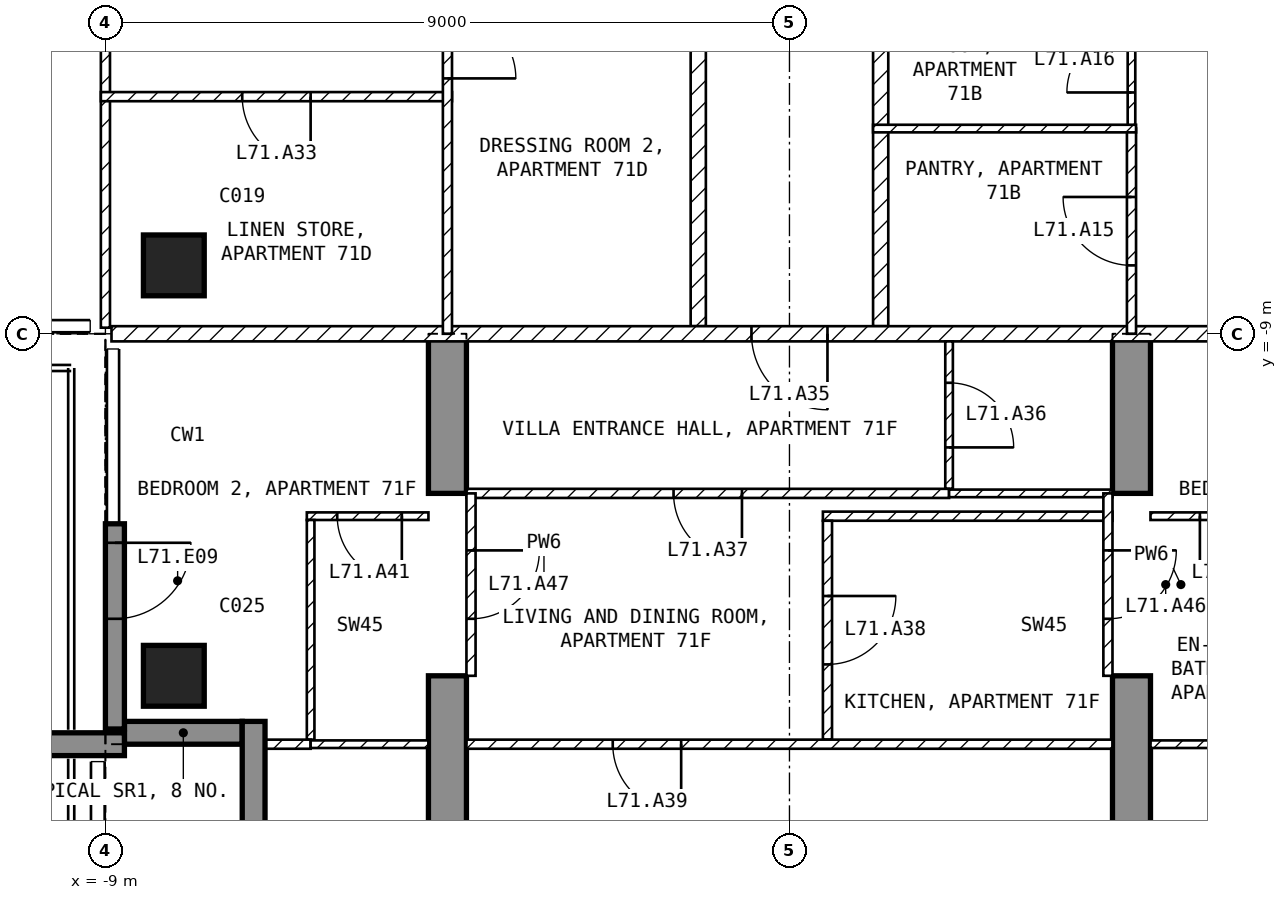
"""IFC4 building model, lengths in metres.
Left out: names, types, materials, properties, quantities, classifications, styles, units other than length and angle.
Written with IfcOpenShell. Run it as: python <this file> out.ifc"""

import sys

from ifc_helpers import new_model, si_unit, direction, frame, frame_2d, origin, origin_2d, place, context, subcontext, project, spatial, polyline, rectangle, outline, extrude, element, fill, save


model = new_model("IFC4")
c1 = context("Model", 3, precision=1e-05, world=origin(), true_north=direction((0.0, 1.0)))
c2 = subcontext(c1, "Body", "Model", "MODEL_VIEW")
j1 = project(units=[si_unit("LENGTHUNIT", "METRE"), si_unit("PLANEANGLEUNIT", "RADIAN")], contexts=[c1])
p1 = place(None, origin())
s1 = spatial("IfcSite", under=j1, at=p1, CompositionType="ELEMENT")
p2 = place(p1, origin())
s2 = spatial("IfcBuilding", under=s1, at=p2, CompositionType="ELEMENT")
p3 = place(p2, frame((0.0, 0.0, 278.0)))
s3 = spatial("IfcBuildingStorey", under=s2, at=p3, CompositionType="ELEMENT", Elevation=278.0)
for number, where, z_axis, x_axis in (
    (1, (-8.1, -13.5, -0.25), (0.0, 0.0, 1.0), (1.0, 0.0, 0.0)),
    (2, (-8.1, -8.1, -0.25), (0.0, 0.0, 1.0), (1.0, 0.0, 0.0)),
):
    element("IfcColumn", number, at=place(p3, frame(where, z_axis=z_axis, x_axis=x_axis)), inside=s3, PredefinedType="COLUMN", context=c2, shape_type="SweptSolid", body=[
        extrude(rectangle(XDim=0.8, YDim=0.8, at=origin_2d()), origin(), (0.0, 0.0, 1.0), 3.5),
    ])
for number, where, z_axis, x_axis in (
    (3, (-4.75, -16.7, -0.25), (1.0, 0.0, 0.0), (0.0, 1.0, 0.0)),
    (4, (4.25, -16.7, -0.25), (1.0, 0.0, 0.0), (0.0, 1.0, 0.0)),
):
    element("IfcWall", number, at=place(p3, frame(where, z_axis=z_axis, x_axis=x_axis)), inside=s3, PredefinedType="SHEAR", context=c2, shape_type="SweptSolid", body=[
        extrude(outline(polyline([(0.0, 0.0), (3.2, 0.0), (3.2, 2.65), (5.6, 2.65), (5.6, 0.0), (7.7, 0.0), (7.7, 3.5), (0.0, 3.5), (0.0, 0.0)])), origin(), (0.0, 0.0, 1.0), 0.5),
    ])
p4 = place(p3, frame((-8.875, -11.5, 0.0), z_axis=(0.0, 0.0, 1.0), x_axis=(0.0, -1.0, 0.0)))
e5 = element("IfcWall", 5, at=p4, inside=s3, PredefinedType="SOLIDWALL", context=c2, shape_type="SweptSolid", body=[
    extrude(rectangle(XDim=2.7, YDim=0.25, at=frame_2d((1.35, 0.0))), origin(), (0.0, 0.0, 1.0), 3.25),
])
p5 = place(p4, frame((0.25, 0.0, 0.0)))
e6 = element("IfcOpeningElement", 6, at=p5, cuts=e5, PredefinedType="OPENING", context=c2, shape_type="SweptSolid", body=[
    extrude(rectangle(XDim=1.0, YDim=2.4, at=frame_2d((0.5, 1.2))), frame((0.0, 0.135, 0.0), z_axis=(0.0, -1.0, 0.0), x_axis=(1.0, 0.0, 0.0)), (0.0, 0.0, 1.0), 0.27),
])
p6 = place(p3, frame((-8.75, -14.25, 0.0), z_axis=(0.0, 0.0, 1.0), x_axis=(1.0, 0.0, 0.0)))
e7 = element("IfcWall", 7, at=p6, inside=s3, PredefinedType="SOLIDWALL", context=c2, shape_type="SweptSolid", body=[
    extrude(rectangle(XDim=1.55, YDim=0.3, at=frame_2d((0.775, 0.0))), origin(), (0.0, 0.0, 1.0), 3.25),
])
p7 = place(p3, frame((-7.05, -14.1, 0.0), z_axis=(0.0, 0.0, 1.0), x_axis=(0.0, -1.0, 0.0)))
e8 = element("IfcWall", 8, at=p7, inside=s3, PredefinedType="SOLIDWALL", context=c2, shape_type="SweptSolid", body=[
    extrude(rectangle(XDim=1.8, YDim=0.3, at=frame_2d((0.9, 0.0))), origin(), (0.0, 0.0, 1.0), 3.25),
])
p8 = place(p3, frame((-8.75, -14.4, 0.0), z_axis=(0.0, 0.0, 1.0), x_axis=(-1.0, 0.0, 0.0)))
e9 = element("IfcWall", 9, at=p8, inside=s3, PredefinedType="SOLIDWALL", context=c2, shape_type="SweptSolid", body=[
    extrude(rectangle(XDim=2.95, YDim=0.3, at=frame_2d((1.475, 0.0))), origin(), (0.0, 0.0, 1.0), 3.25),
])
for number, where, z_axis, x_axis in (
    (10, (1.2, -4.6, 0.0), (0.0, 0.0, 1.0), (0.0, -1.0, 0.0)),
    (11, (-1.2, -8.9, 0.0), (0.0, 0.0, 1.0), (0.0, 1.0, 0.0)),
):
    element("IfcWall", number, at=place(p3, frame(where, z_axis=z_axis, x_axis=x_axis)), inside=s3, PredefinedType="PARTITIONING", context=c2, shape_type="SweptSolid", body=[
        extrude(rectangle(XDim=4.3, YDim=0.2, at=frame_2d((2.15, 0.0))), origin(), (0.0, 0.0, 1.0), 3.25),
    ])
p9 = place(p3, frame((8.92, -9.0, 0.0), z_axis=(0.0, 0.0, 1.0), x_axis=(-1.0, 0.0, 0.0)))
e12 = element("IfcWall", 12, at=p9, inside=s3, PredefinedType="PARTITIONING", context=c2, shape_type="SweptSolid", body=[
    extrude(rectangle(XDim=17.84, YDim=0.2, at=frame_2d((8.92, 0.0))), origin(), (0.0, 0.0, 1.0), 3.25),
])
p10 = place(p9, frame((8.42, 0.0, 0.0)))
e13 = element("IfcOpeningElement", 13, at=p10, cuts=e12, PredefinedType="OPENING", context=c2, shape_type="SweptSolid", body=[
    extrude(rectangle(XDim=1.0, YDim=2.1, at=frame_2d((0.5, 1.05))), frame((0.0, 0.11, 0.0), z_axis=(0.0, -1.0, 0.0), x_axis=(1.0, 0.0, 0.0)), (0.0, 0.0, 1.0), 0.22),
])
p11 = place(p3, frame((4.5, -6.3, 0.0), z_axis=(0.0, 0.0, 1.0), x_axis=(0.0, 1.0, 0.0)))
e14 = element("IfcWall", 14, at=p11, inside=s3, PredefinedType="PARTITIONING", context=c2, shape_type="SweptSolid", body=[
    extrude(rectangle(XDim=1.8, YDim=0.1, at=frame_2d((0.9, 0.0))), origin(), (0.0, 0.0, 1.0), 3.25),
])
p12 = place(p11, frame((0.475, 0.0, 0.0)))
e15 = element("IfcOpeningElement", 15, at=p12, cuts=e14, PredefinedType="OPENING", context=c2, shape_type="SweptSolid", body=[
    extrude(rectangle(XDim=0.85, YDim=2.1, at=frame_2d((0.425, 1.05))), frame((0.0, 0.06, 0.0), z_axis=(0.0, -1.0, 0.0), x_axis=(1.0, 0.0, 0.0)), (0.0, 0.0, 1.0), 0.12),
])
p13 = place(p3, frame((4.5, -9.0, 0.0), z_axis=(0.0, 0.0, 1.0), x_axis=(0.0, 1.0, 0.0)))
e16 = element("IfcWall", 16, at=p13, inside=s3, PredefinedType="PARTITIONING", context=c2, shape_type="SweptSolid", body=[
    extrude(rectangle(XDim=2.7, YDim=0.12, at=frame_2d((1.35, 0.0))), origin(), (0.0, 0.0, 1.0), 3.25),
])
p14 = place(p13, frame((0.9, 0.0, 0.0)))
e17 = element("IfcOpeningElement", 17, at=p14, cuts=e16, PredefinedType="OPENING", context=c2, shape_type="SweptSolid", body=[
    extrude(rectangle(XDim=0.9, YDim=2.1, at=frame_2d((0.45, 1.05))), frame((0.0, 0.07, 0.0), z_axis=(0.0, -1.0, 0.0), x_axis=(1.0, 0.0, 0.0)), (0.0, 0.0, 1.0), 0.14),
])
p15 = place(p3, frame((4.56, -6.3, 0.0), z_axis=(0.0, 0.0, 1.0), x_axis=(-1.0, 0.0, 0.0)))
e18 = element("IfcWall", 18, at=p15, inside=s3, PredefinedType="PARTITIONING", context=c2, shape_type="SweptSolid", body=[
    extrude(rectangle(XDim=3.46, YDim=0.1, at=frame_2d((1.73, 0.0))), origin(), (0.0, 0.0, 1.0), 3.25),
])
p16 = place(p3, frame((-9.0, -1.3, 0.0), z_axis=(0.0, 0.0, 1.0), x_axis=(0.0, -1.0, 0.0)))
e19 = element("IfcWall", 19, at=p16, inside=s3, PredefinedType="PARTITIONING", context=c2, shape_type="SweptSolid", body=[
    extrude(rectangle(XDim=7.62, YDim=0.12, at=frame_2d((3.81, 0.0))), origin(), (0.0, 0.0, 1.0), 3.25),
])
p17 = place(p16, frame((1.15, 0.0, 0.0)))
e20 = element("IfcOpeningElement", 20, at=p17, cuts=e19, PredefinedType="OPENING", context=c2, shape_type="SweptSolid", body=[
    extrude(rectangle(XDim=0.9, YDim=2.1, at=frame_2d((0.45, 1.05))), frame((0.0, 0.07, 0.0), z_axis=(0.0, -1.0, 0.0), x_axis=(1.0, 0.0, 0.0)), (0.0, 0.0, 1.0), 0.14),
])
p18 = place(p3, frame((-4.44, -5.88, 0.0), z_axis=(0.0, 0.0, 1.0), x_axis=(-1.0, 0.0, 0.0)))
e21 = element("IfcWall", 21, at=p18, inside=s3, PredefinedType="PARTITIONING", context=c2, shape_type="SweptSolid", body=[
    extrude(rectangle(XDim=4.62, YDim=0.12, at=frame_2d((2.31, 0.0))), origin(), (0.0, 0.0, 1.0), 3.25),
])
p19 = place(p18, frame((1.86, 0.0, 0.0)))
e22 = element("IfcOpeningElement", 22, at=p19, cuts=e21, PredefinedType="OPENING", context=c2, shape_type="SweptSolid", body=[
    extrude(rectangle(XDim=0.9, YDim=2.1, at=frame_2d((0.45, 1.05))), frame((0.0, 0.07, 0.0), z_axis=(0.0, -1.0, 0.0), x_axis=(1.0, 0.0, 0.0)), (0.0, 0.0, 1.0), 0.14),
])
p20 = place(p3, frame((-4.5, -4.5, 0.0), z_axis=(0.0, 0.0, 1.0), x_axis=(0.0, -1.0, 0.0)))
e23 = element("IfcWall", 23, at=p20, inside=s3, PredefinedType="PARTITIONING", context=c2, shape_type="SweptSolid", body=[
    extrude(rectangle(XDim=4.5, YDim=0.12, at=frame_2d((2.25, 0.0))), origin(), (0.0, 0.0, 1.0), 3.25),
])
p21 = place(p20, frame((0.24, 0.0, 0.0)))
e24 = element("IfcOpeningElement", 24, at=p21, cuts=e23, PredefinedType="OPENING", context=c2, shape_type="SweptSolid", body=[
    extrude(rectangle(XDim=0.9, YDim=2.1, at=frame_2d((0.45, 1.05))), frame((0.0, 0.07, 0.0), z_axis=(0.0, -1.0, 0.0), x_axis=(1.0, 0.0, 0.0)), (0.0, 0.0, 1.0), 0.14),
])
p22 = place(p3, frame((2.1, -9.1, 0.0), z_axis=(0.0, 0.0, 1.0), x_axis=(0.0, -1.0, 0.0)))
e25 = element("IfcWall", 25, at=p22, inside=s3, PredefinedType="PARTITIONING", context=c2, shape_type="SweptSolid", body=[
    extrude(rectangle(XDim=1.94, YDim=0.1, at=frame_2d((0.97, 0.0))), origin(), (0.0, 0.0, 1.0), 3.25),
])
p23 = place(p22, frame((0.545, 0.0, 0.0)))
e26 = element("IfcOpeningElement", 26, at=p23, cuts=e25, PredefinedType="OPENING", context=c2, shape_type="SweptSolid", body=[
    extrude(rectangle(XDim=0.85, YDim=2.1, at=frame_2d((0.425, 1.05))), frame((0.0, 0.06, 0.0), z_axis=(0.0, -1.0, 0.0), x_axis=(1.0, 0.0, 0.0)), (0.0, 0.0, 1.0), 0.12),
])
p24 = place(p3, frame((2.1, -11.1, 0.0), z_axis=(0.0, 0.0, 1.0), x_axis=(-1.0, 0.0, 0.0)))
e27 = element("IfcWall", 27, at=p24, inside=s3, PredefinedType="PARTITIONING", context=c2, shape_type="SweptSolid", body=[
    extrude(rectangle(XDim=6.35, YDim=0.12, at=frame_2d((3.175, 0.0))), origin(), (0.0, 0.0, 1.0), 3.25),
])
p25 = place(p24, frame((2.725, 0.0, 0.0)))
e28 = element("IfcOpeningElement", 28, at=p25, cuts=e27, PredefinedType="OPENING", context=c2, shape_type="SweptSolid", body=[
    extrude(rectangle(XDim=0.9, YDim=2.1, at=frame_2d((0.45, 1.05))), frame((0.0, 0.07, 0.0), z_axis=(0.0, -1.0, 0.0), x_axis=(1.0, 0.0, 0.0)), (0.0, 0.0, 1.0), 0.14),
])
p26 = place(p3, frame((4.25, -11.1, 0.0), z_axis=(0.0, 0.0, 1.0), x_axis=(-1.0, 0.0, 0.0)))
e29 = element("IfcWall", 29, at=p26, inside=s3, PredefinedType="PARTITIONING", context=c2, shape_type="SweptSolid", body=[
    extrude(rectangle(XDim=2.15, YDim=0.1, at=frame_2d((1.075, 0.0))), origin(), (0.0, 0.0, 1.0), 3.25),
])
p27 = place(p3, frame((4.25, -11.4, 0.0), z_axis=(0.0, 0.0, 1.0), x_axis=(-1.0, 0.0, 0.0)))
e30 = element("IfcWall", 30, at=p27, inside=s3, PredefinedType="PARTITIONING", context=c2, shape_type="SweptSolid", body=[
    extrude(rectangle(XDim=3.81, YDim=0.12, at=frame_2d((1.905, 0.0))), origin(), (0.0, 0.0, 1.0), 3.25),
])
p28 = place(p3, frame((0.5, -11.46, 0.0), z_axis=(0.0, 0.0, 1.0), x_axis=(0.0, -1.0, 0.0)))
e31 = element("IfcWall", 31, at=p28, inside=s3, PredefinedType="PARTITIONING", context=c2, shape_type="SweptSolid", body=[
    extrude(rectangle(XDim=2.88, YDim=0.12, at=frame_2d((1.44, 0.0))), origin(), (0.0, 0.0, 1.0), 3.25),
])
p29 = place(p28, frame((0.99, 0.0, 0.0)))
e32 = element("IfcOpeningElement", 32, at=p29, cuts=e31, PredefinedType="OPENING", context=c2, shape_type="SweptSolid", body=[
    extrude(rectangle(XDim=0.9, YDim=2.1, at=frame_2d((0.45, 1.05))), frame((0.0, 0.07, 0.0), z_axis=(0.0, -1.0, 0.0), x_axis=(1.0, 0.0, 0.0)), (0.0, 0.0, 1.0), 0.14),
])
p30 = place(p3, frame((4.25, -14.4, 0.0), z_axis=(0.0, 0.0, 1.0), x_axis=(-1.0, 0.0, 0.0)))
e33 = element("IfcWall", 33, at=p30, inside=s3, PredefinedType="PARTITIONING", context=c2, shape_type="SweptSolid", body=[
    extrude(rectangle(XDim=8.5, YDim=0.12, at=frame_2d((4.25, 0.0))), origin(), (0.0, 0.0, 1.0), 3.25),
])
p31 = place(p30, frame((5.675, 0.0, 0.0)))
e34 = element("IfcOpeningElement", 34, at=p31, cuts=e33, PredefinedType="OPENING", context=c2, shape_type="SweptSolid", body=[
    extrude(rectangle(XDim=0.9, YDim=2.1, at=frame_2d((0.45, 1.05))), frame((0.0, 0.07, 0.0), z_axis=(0.0, -1.0, 0.0), x_axis=(1.0, 0.0, 0.0)), (0.0, 0.0, 1.0), 0.14),
])
p32 = place(p3, frame((6.95, -11.4, 0.0), z_axis=(0.0, 0.0, 1.0), x_axis=(-1.0, 0.0, 0.0)))
e35 = element("IfcWall", 35, at=p32, inside=s3, PredefinedType="PARTITIONING", context=c2, shape_type="SweptSolid", body=[
    extrude(rectangle(XDim=2.2, YDim=0.1, at=frame_2d((1.1, 0.0))), origin(), (0.0, 0.0, 1.0), 3.25),
])
p33 = place(p32, frame((0.7, 0.0, 0.0)))
e36 = element("IfcOpeningElement", 36, at=p33, cuts=e35, PredefinedType="OPENING", context=c2, shape_type="SweptSolid", body=[
    extrude(rectangle(XDim=0.85, YDim=2.1, at=frame_2d((0.425, 1.05))), frame((0.0, 0.06, 0.0), z_axis=(0.0, -1.0, 0.0), x_axis=(1.0, 0.0, 0.0)), (0.0, 0.0, 1.0), 0.12),
])
p34 = place(p3, frame((7.12, -14.4, 0.0), z_axis=(0.0, 0.0, 1.0), x_axis=(-1.0, 0.0, 0.0)))
e37 = element("IfcWall", 37, at=p34, inside=s3, PredefinedType="PARTITIONING", context=c2, shape_type="SweptSolid", body=[
    extrude(rectangle(XDim=2.37, YDim=0.1, at=frame_2d((1.185, 0.0))), origin(), (0.0, 0.0, 1.0), 3.25),
])
p35 = place(p3, frame((-4.75, -11.4, 0.0), z_axis=(0.0, 0.0, 1.0), x_axis=(-1.0, 0.0, 0.0)))
e38 = element("IfcWall", 38, at=p35, inside=s3, PredefinedType="PARTITIONING", context=c2, shape_type="SweptSolid", body=[
    extrude(rectangle(XDim=1.6, YDim=0.1, at=frame_2d((0.8, 0.0))), origin(), (0.0, 0.0, 1.0), 3.25),
])
p36 = place(p35, frame((0.35, 0.0, 0.0)))
e39 = element("IfcOpeningElement", 39, at=p36, cuts=e38, PredefinedType="OPENING", context=c2, shape_type="SweptSolid", body=[
    extrude(rectangle(XDim=0.85, YDim=2.1, at=frame_2d((0.425, 1.05))), frame((0.0, 0.06, 0.0), z_axis=(0.0, -1.0, 0.0), x_axis=(1.0, 0.0, 0.0)), (0.0, 0.0, 1.0), 0.12),
])
p37 = place(p3, frame((-6.3, -11.45, 0.0), z_axis=(0.0, 0.0, 1.0), x_axis=(0.0, -1.0, 0.0)))
e40 = element("IfcWall", 40, at=p37, inside=s3, PredefinedType="PARTITIONING", context=c2, shape_type="SweptSolid", body=[
    extrude(rectangle(XDim=2.89, YDim=0.1, at=frame_2d((1.445, 0.0))), origin(), (0.0, 0.0, 1.0), 3.25),
])
p38 = place(p3, frame((-6.3, -14.4, 0.0), z_axis=(0.0, 0.0, 1.0), x_axis=(-1.0, 0.0, 0.0)))
e41 = element("IfcWall", 41, at=p38, inside=s3, PredefinedType="PARTITIONING", context=c2, shape_type="SweptSolid", body=[
    extrude(rectangle(XDim=0.82, YDim=0.12, at=frame_2d((0.41, 0.0))), origin(), (0.0, 0.0, 1.0), 3.25),
])
p39 = place(p3, frame((-4.75, -14.4, 0.0), z_axis=(0.0, 0.0, 1.0), x_axis=(-1.0, 0.0, 0.0)))
e42 = element("IfcWall", 42, at=p39, inside=s3, PredefinedType="PARTITIONING", context=c2, shape_type="SweptSolid", body=[
    extrude(rectangle(XDim=1.55, YDim=0.1, at=frame_2d((0.775, 0.0))), origin(), (0.0, 0.0, 1.0), 3.25),
])
p40 = place(p3, frame((4.19, -11.1, 0.0), z_axis=(0.0, 0.0, 1.0), x_axis=(0.0, -1.0, 0.0)))
e43 = element("IfcWall", 43, at=p40, inside=s3, PredefinedType="PARTITIONING", context=c2, shape_type="SweptSolid", body=[
    extrude(rectangle(XDim=2.4, YDim=0.12, at=frame_2d((1.2, 0.0))), origin(), (0.0, 0.0, 1.0), 2.4),
])
p41 = place(p40, frame((0.75, 0.0, 0.0)))
e44 = element("IfcOpeningElement", 44, at=p41, cuts=e43, PredefinedType="OPENING", context=c2, shape_type="SweptSolid", body=[
    extrude(rectangle(XDim=0.9, YDim=2.1, at=frame_2d((0.45, 1.05))), frame((0.0, 0.07, 0.0), z_axis=(0.0, -1.0, 0.0), x_axis=(1.0, 0.0, 0.0)), (0.0, 0.0, 1.0), 0.14),
])
p42 = place(p3, frame((-4.19, -11.1, 0.0), z_axis=(0.0, 0.0, 1.0), x_axis=(0.0, -1.0, 0.0)))
e45 = element("IfcWall", 45, at=p42, inside=s3, PredefinedType="PARTITIONING", context=c2, shape_type="SweptSolid", body=[
    extrude(rectangle(XDim=2.4, YDim=0.12, at=frame_2d((1.2, 0.0))), origin(), (0.0, 0.0, 1.0), 2.4),
])
p43 = place(p42, frame((0.75, 0.0, 0.0)))
e46 = element("IfcOpeningElement", 46, at=p43, cuts=e45, PredefinedType="OPENING", context=c2, shape_type="SweptSolid", body=[
    extrude(rectangle(XDim=0.9, YDim=2.1, at=frame_2d((0.45, 1.05))), frame((0.0, 0.07, 0.0), z_axis=(0.0, -1.0, 0.0), x_axis=(1.0, 0.0, 0.0)), (0.0, 0.0, 1.0), 0.14),
])
p44 = place(p5, origin())
e47 = element("IfcDoor", 47, at=p44, inside=s3, OperationType="SINGLE_SWING_LEFT", PredefinedType="DOOR", context=c2, shape_type="SweptSolid", body=[
    extrude(rectangle(XDim=1.0, YDim=2.4, at=frame_2d((0.5, 1.2))), frame((0.0, 0.025, 0.0), z_axis=(0.0, -1.0, 0.0), x_axis=(1.0, 0.0, 0.0)), (0.0, 0.0, 1.0), 0.05),
])
fill(e6, e47)
p45 = place(p14, origin())
e48 = element("IfcDoor", 48, at=p45, inside=s3, OperationType="SINGLE_SWING_RIGHT", PredefinedType="DOOR", context=c2, shape_type="SweptSolid", body=[
    extrude(rectangle(XDim=0.9, YDim=2.1, at=frame_2d((0.45, 1.05))), frame((0.0, 0.025, 0.0), z_axis=(0.0, -1.0, 0.0), x_axis=(1.0, 0.0, 0.0)), (0.0, 0.0, 1.0), 0.05),
])
fill(e17, e48)
p46 = place(p12, origin())
e49 = element("IfcDoor", 49, at=p46, inside=s3, OperationType="SINGLE_SWING_LEFT", PredefinedType="DOOR", context=c2, shape_type="SweptSolid", body=[
    extrude(rectangle(XDim=0.85, YDim=2.1, at=frame_2d((0.425, 1.05))), frame((0.0, 0.025, 0.0), z_axis=(0.0, -1.0, 0.0), x_axis=(1.0, 0.0, 0.0)), (0.0, 0.0, 1.0), 0.05),
])
fill(e15, e49)
p47 = place(p21, origin())
e50 = element("IfcDoor", 50, at=p47, inside=s3, OperationType="SINGLE_SWING_RIGHT", PredefinedType="DOOR", context=c2, shape_type="SweptSolid", body=[
    extrude(rectangle(XDim=0.9, YDim=2.1, at=frame_2d((0.45, 1.05))), frame((0.0, 0.025, 0.0), z_axis=(0.0, -1.0, 0.0), x_axis=(1.0, 0.0, 0.0)), (0.0, 0.0, 1.0), 0.05),
])
fill(e24, e50)
p48 = place(p19, origin())
e51 = element("IfcDoor", 51, at=p48, inside=s3, OperationType="SINGLE_SWING_LEFT", PredefinedType="DOOR", context=c2, shape_type="SweptSolid", body=[
    extrude(rectangle(XDim=0.9, YDim=2.1, at=frame_2d((0.45, 1.05))), frame((0.0, 0.025, 0.0), z_axis=(0.0, -1.0, 0.0), x_axis=(1.0, 0.0, 0.0)), (0.0, 0.0, 1.0), 0.05),
])
fill(e22, e51)
p49 = place(p10, origin())
e52 = element("IfcDoor", 52, at=p49, inside=s3, OperationType="SINGLE_SWING_LEFT", PredefinedType="DOOR", context=c2, shape_type="SweptSolid", body=[
    extrude(rectangle(XDim=1.0, YDim=2.1, at=frame_2d((0.5, 1.05))), frame((0.0, 0.025, 0.0), z_axis=(0.0, -1.0, 0.0), x_axis=(1.0, 0.0, 0.0)), (0.0, 0.0, 1.0), 0.05),
])
fill(e13, e52)
p50 = place(p23, origin())
e53 = element("IfcDoor", 53, at=p50, inside=s3, OperationType="SINGLE_SWING_RIGHT", PredefinedType="DOOR", context=c2, shape_type="SweptSolid", body=[
    extrude(rectangle(XDim=0.85, YDim=2.1, at=frame_2d((0.425, 1.05))), frame((0.0, 0.025, 0.0), z_axis=(0.0, -1.0, 0.0), x_axis=(1.0, 0.0, 0.0)), (0.0, 0.0, 1.0), 0.05),
])
fill(e26, e53)
p51 = place(p25, origin())
e54 = element("IfcDoor", 54, at=p51, inside=s3, OperationType="SINGLE_SWING_LEFT", PredefinedType="DOOR", context=c2, shape_type="SweptSolid", body=[
    extrude(rectangle(XDim=0.9, YDim=2.1, at=frame_2d((0.45, 1.05))), frame((0.0, 0.025, 0.0), z_axis=(0.0, -1.0, 0.0), x_axis=(1.0, 0.0, 0.0)), (0.0, 0.0, 1.0), 0.05),
])
fill(e28, e54)
p52 = place(p29, origin())
e55 = element("IfcDoor", 55, at=p52, inside=s3, OperationType="SINGLE_SWING_LEFT", PredefinedType="DOOR", context=c2, shape_type="SweptSolid", body=[
    extrude(rectangle(XDim=0.9, YDim=2.1, at=frame_2d((0.45, 1.05))), frame((0.0, 0.025, 0.0), z_axis=(0.0, -1.0, 0.0), x_axis=(1.0, 0.0, 0.0)), (0.0, 0.0, 1.0), 0.05),
])
fill(e32, e55)
p53 = place(p31, origin())
e56 = element("IfcDoor", 56, at=p53, inside=s3, OperationType="SINGLE_SWING_LEFT", PredefinedType="DOOR", context=c2, shape_type="SweptSolid", body=[
    extrude(rectangle(XDim=0.9, YDim=2.1, at=frame_2d((0.45, 1.05))), frame((0.0, 0.025, 0.0), z_axis=(0.0, -1.0, 0.0), x_axis=(1.0, 0.0, 0.0)), (0.0, 0.0, 1.0), 0.05),
])
fill(e34, e56)
p54 = place(p33, origin())
e57 = element("IfcDoor", 57, at=p54, inside=s3, OperationType="SINGLE_SWING_RIGHT", PredefinedType="DOOR", context=c2, shape_type="SweptSolid", body=[
    extrude(rectangle(XDim=0.85, YDim=2.1, at=frame_2d((0.425, 1.05))), frame((0.0, 0.025, 0.0), z_axis=(0.0, -1.0, 0.0), x_axis=(1.0, 0.0, 0.0)), (0.0, 0.0, 1.0), 0.05),
])
fill(e36, e57)
p55 = place(p36, origin())
e58 = element("IfcDoor", 58, at=p55, inside=s3, OperationType="SINGLE_SWING_LEFT", PredefinedType="DOOR", context=c2, shape_type="SweptSolid", body=[
    extrude(rectangle(XDim=0.85, YDim=2.1, at=frame_2d((0.425, 1.05))), frame((0.0, 0.025, 0.0), z_axis=(0.0, -1.0, 0.0), x_axis=(1.0, 0.0, 0.0)), (0.0, 0.0, 1.0), 0.05),
])
fill(e39, e58)
p56 = place(p41, origin())
e59 = element("IfcDoor", 59, at=p56, inside=s3, OperationType="SINGLE_SWING_LEFT", PredefinedType="DOOR", context=c2, shape_type="SweptSolid", body=[
    extrude(rectangle(XDim=0.9, YDim=2.1, at=frame_2d((0.45, 1.05))), frame((0.0, 0.025, 0.0), z_axis=(0.0, -1.0, 0.0), x_axis=(1.0, 0.0, 0.0)), (0.0, 0.0, 1.0), 0.05),
])
fill(e44, e59)
p57 = place(p43, origin())
e60 = element("IfcDoor", 60, at=p57, inside=s3, OperationType="SINGLE_SWING_LEFT", PredefinedType="DOOR", context=c2, shape_type="SweptSolid", body=[
    extrude(rectangle(XDim=0.9, YDim=2.1, at=frame_2d((0.45, 1.05))), frame((0.0, 0.025, 0.0), z_axis=(0.0, -1.0, 0.0), x_axis=(1.0, 0.0, 0.0)), (0.0, 0.0, 1.0), 0.05),
])
fill(e46, e60)
save(model, sys.argv[1])
